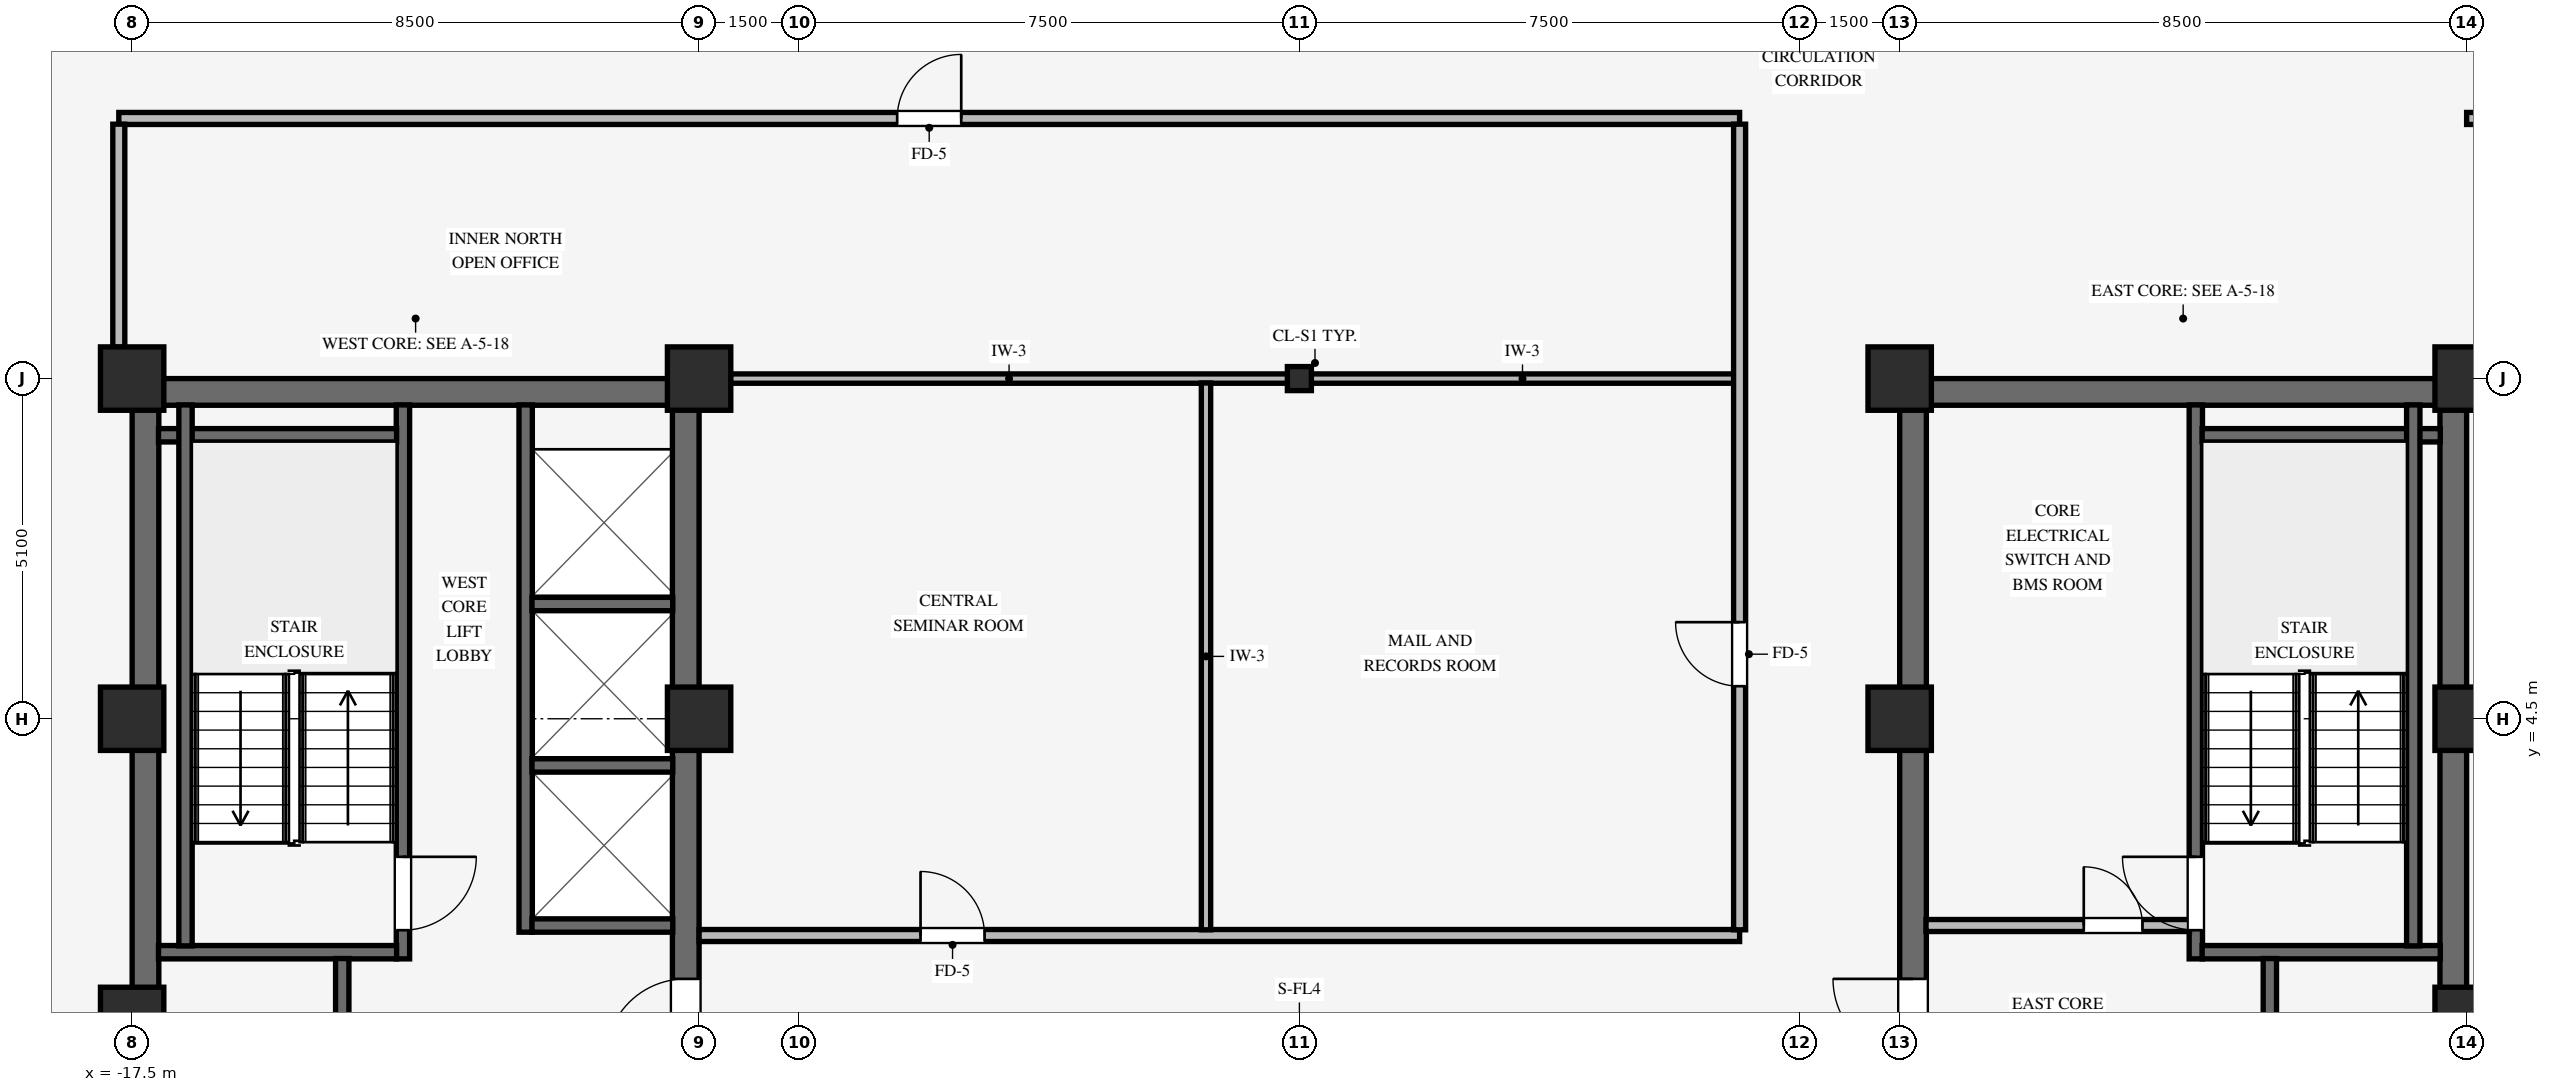
"""IFC4 building model, lengths in metres.
Left out: names, types, materials, properties, quantities, classifications, styles, units other than length and angle.
Written with IfcOpenShell. Run it as: python <this file> out.ifc"""

import sys

from ifc_helpers import new_model, si_unit, direction, frame, frame_2d, origin, origin_2d, place, context, subcontext, project, spatial, rectangle, i_section, extrude, source, transform, mapped, element, fill, save


model = new_model("IFC4")
c1 = context("Model", 3, precision=1e-05, world=origin(), true_north=direction((0.0, 1.0)))
c2 = subcontext(c1, "Body", "Model", "MODEL_VIEW")
j1 = project(units=[si_unit("LENGTHUNIT", "METRE"), si_unit("PLANEANGLEUNIT", "RADIAN")], contexts=[c1])
p1 = place(None, origin())
s1 = spatial("IfcSite", under=j1, at=p1, CompositionType="ELEMENT")
p2 = place(p1, origin())
s2 = spatial("IfcBuilding", under=s1, at=p2, CompositionType="ELEMENT")
p3 = place(p2, frame((0.0, 0.0, 127.5)))
s3 = spatial("IfcBuildingStorey", under=s2, at=p3, CompositionType="ELEMENT", Elevation=127.5)
p4 = place(p3, frame((-17.5, 9.4, 0.0), z_axis=(0.0, 0.0, 1.0), x_axis=(1.0, 0.0, 0.0)))
e1 = element("IfcWall", 1, at=p4, inside=s3, PredefinedType="SHEAR", context=c2, shape_type="SweptSolid", body=[
    extrude(rectangle(XDim=8.5, YDim=0.4, at=frame_2d((4.25, 0.0))), origin(), (0.0, 0.0, 1.0), 3.37),
])
p5 = place(p3, frame((-17.3, -9.205, 0.0), z_axis=(0.0, 0.0, 1.0), x_axis=(0.0, 1.0, 0.0)))
e2 = element("IfcWall", 2, at=p5, inside=s3, PredefinedType="SHEAR", context=c2, shape_type="SweptSolid", body=[
    extrude(rectangle(XDim=18.41, YDim=0.4, at=frame_2d((9.205, 0.0))), origin(), (0.0, 0.0, 1.0), 3.37),
])
p6 = place(p3, frame((-9.2, -9.205, 0.0), z_axis=(0.0, 0.0, 1.0), x_axis=(0.0, 1.0, 0.0)))
e3 = element("IfcWall", 3, at=p6, inside=s3, PredefinedType="SHEAR", context=c2, shape_type="SweptSolid", body=[
    extrude(rectangle(XDim=18.41, YDim=0.4, at=frame_2d((9.205, 0.0))), origin(), (0.0, 0.0, 1.0), 3.37),
])
p7 = place(p6, frame((8.605, 0.0, 0.0)))
e4 = element("IfcOpeningElement", 4, at=p7, cuts=e3, PredefinedType="OPENING", context=c2, shape_type="SweptSolid", body=[
    extrude(rectangle(XDim=1.2, YDim=2.15, at=frame_2d((0.6, 1.075))), frame((0.0, 0.21, 0.0), z_axis=(0.0, -1.0, 0.0), x_axis=(1.0, 0.0, 0.0)), (0.0, 0.0, 1.0), 0.42),
])
p8 = place(p3, frame((9.0, 9.4, 0.0), z_axis=(0.0, 0.0, 1.0), x_axis=(1.0, 0.0, 0.0)))
e5 = element("IfcWall", 5, at=p8, inside=s3, PredefinedType="SHEAR", context=c2, shape_type="SweptSolid", body=[
    extrude(rectangle(XDim=8.5, YDim=0.4, at=frame_2d((4.25, 0.0))), origin(), (0.0, 0.0, 1.0), 3.37),
])
p9 = place(p3, frame((9.2, -9.205, 0.0), z_axis=(0.0, 0.0, 1.0), x_axis=(0.0, 1.0, 0.0)))
e6 = element("IfcWall", 6, at=p9, inside=s3, PredefinedType="SHEAR", context=c2, shape_type="SweptSolid", body=[
    extrude(rectangle(XDim=18.41, YDim=0.4, at=frame_2d((9.205, 0.0))), origin(), (0.0, 0.0, 1.0), 3.37),
])
p10 = place(p9, frame((8.605, 0.0, 0.0)))
e7 = element("IfcOpeningElement", 7, at=p10, cuts=e6, PredefinedType="OPENING", context=c2, shape_type="SweptSolid", body=[
    extrude(rectangle(XDim=1.2, YDim=2.15, at=frame_2d((0.6, 1.075))), frame((0.0, 0.21, 0.0), z_axis=(0.0, -1.0, 0.0), x_axis=(1.0, 0.0, 0.0)), (0.0, 0.0, 1.0), 0.42),
])
p11 = place(p3, frame((17.3, -9.205, 0.0), z_axis=(0.0, 0.0, 1.0), x_axis=(0.0, 1.0, 0.0)))
e8 = element("IfcWall", 8, at=p11, inside=s3, PredefinedType="SHEAR", context=c2, shape_type="SweptSolid", body=[
    extrude(rectangle(XDim=18.41, YDim=0.4, at=frame_2d((9.205, 0.0))), origin(), (0.0, 0.0, 1.0), 3.37),
])
for number, where, z_axis, x_axis in (
    (9, (-17.5, 4.5, 0.0), (0.0, 0.0, 1.0), (1.0, 0.0, 0.0)),
    (10, (-17.5, 9.6, 0.0), (0.0, 0.0, 1.0), (1.0, 0.0, 0.0)),
    (11, (-9.0, 4.5, 0.0), (0.0, 0.0, 1.0), (1.0, 0.0, 0.0)),
    (12, (-9.0, 9.6, 0.0), (0.0, 0.0, 1.0), (1.0, 0.0, 0.0)),
    (13, (9.0, 4.5, 0.0), (0.0, 0.0, 1.0), (1.0, 0.0, 0.0)),
    (14, (9.0, 9.6, 0.0), (0.0, 0.0, 1.0), (1.0, 0.0, 0.0)),
    (15, (17.5, 4.5, 0.0), (0.0, 0.0, 1.0), (1.0, 0.0, 0.0)),
    (16, (17.5, 9.6, 0.0), (0.0, 0.0, 1.0), (1.0, 0.0, 0.0)),
    (17, (-17.5, 0.0, 0.0), (0.0, 0.0, 1.0), (1.0, 0.0, 0.0)),
    (18, (17.5, 0.0, 0.0), (0.0, 0.0, 1.0), (1.0, 0.0, 0.0)),
):
    element("IfcColumn", number, at=place(p3, frame(where, z_axis=z_axis, x_axis=x_axis)), inside=s3, PredefinedType="COLUMN", context=c2, shape_type="SweptSolid", body=[
        extrude(rectangle(XDim=0.95, YDim=0.95, at=origin_2d()), origin(), (0.0, 0.0, 1.0), 3.37),
    ])
p12 = place(p3, frame((0.0, 9.6, 0.0), z_axis=(0.0, 0.0, 1.0), x_axis=(1.0, 0.0, 0.0)))
e19 = element("IfcColumn", 19, at=p12, inside=s3, PredefinedType="COLUMN", context=c2, shape_type="SweptSolid", body=[
    extrude(i_section(OverallWidth=0.36, OverallDepth=0.36, WebThickness=0.021, FlangeThickness=0.021, FilletRadius=0.018, at=origin_2d()), origin(), (0.0, 0.0, 1.0), 3.37),
])
p13 = place(p3, frame((-13.44, 0.9, 0.0), z_axis=(0.0, 0.0, 1.0), x_axis=(0.0, 1.0, 0.0)))
e20 = element("IfcWall", 20, at=p13, inside=s3, PredefinedType="SHEAR", context=c2, shape_type="SweptSolid", body=[
    extrude(rectangle(XDim=8.305, YDim=0.2, at=frame_2d((4.153, 0.0))), origin(), (0.0, 0.0, 1.0), 3.37),
])
p14 = place(p13, frame((1.53, 0.0, 0.0), z_axis=(0.0, 0.0, 1.0), x_axis=(-1.0, 0.0, 0.0)))
e21 = element("IfcOpeningElement", 21, at=p14, cuts=e20, PredefinedType="OPENING", context=c2, shape_type="SweptSolid", body=[
    extrude(rectangle(XDim=1.1, YDim=2.15, at=frame_2d((0.55, 1.075))), frame((0.0, 0.11, 0.0), z_axis=(0.0, -1.0, 0.0), x_axis=(1.0, 0.0, 0.0)), (0.0, 0.0, 1.0), 0.22),
])
for number, where, z_axis, x_axis in (
    (22, (-17.105, 1.0, 0.0), (0.0, 0.0, 1.0), (1.0, 0.0, 0.0)),
    (23, (-17.105, 8.75, 0.0), (0.0, 0.0, 1.0), (1.0, 0.0, 0.0)),
):
    element("IfcWall", number, at=place(p3, frame(where, z_axis=z_axis, x_axis=x_axis)), inside=s3, PredefinedType="SHEAR", context=c2, shape_type="SweptSolid", body=[
        extrude(rectangle(XDim=3.57, YDim=0.2, at=frame_2d((1.785, 0.0))), origin(), (0.0, 0.0, 1.0), 3.37),
    ])
p15 = place(p3, frame((-16.7, 1.095, 0.0), z_axis=(0.0, 0.0, 1.0), x_axis=(0.0, 1.0, 0.0)))
e24 = element("IfcWall", 24, at=p15, inside=s3, PredefinedType="SHEAR", context=c2, shape_type="SweptSolid", body=[
    extrude(rectangle(XDim=8.11, YDim=0.2, at=frame_2d((4.055, 0.0))), origin(), (0.0, 0.0, 1.0), 3.37),
])
p16 = place(p3, frame((-14.35, -6.2, 0.0), z_axis=(0.0, 0.0, 1.0), x_axis=(0.0, 1.0, 0.0)))
e25 = element("IfcWall", 25, at=p16, inside=s3, PredefinedType="SHEAR", context=c2, shape_type="SweptSolid", body=[
    extrude(rectangle(XDim=7.105, YDim=0.2, at=frame_2d((3.552, 0.0))), origin(), (0.0, 0.0, 1.0), 3.37),
])
p17 = place(p16, frame((5.69, 0.0, 0.0), z_axis=(0.0, 0.0, 1.0), x_axis=(-1.0, 0.0, 0.0)))
e26 = element("IfcOpeningElement", 26, at=p17, cuts=e25, PredefinedType="OPENING", context=c2, shape_type="SweptSolid", body=[
    extrude(rectangle(XDim=0.88, YDim=2.1, at=frame_2d((0.44, 1.05))), frame((0.0, 0.11, 0.0), z_axis=(0.0, -1.0, 0.0), x_axis=(1.0, 0.0, 0.0)), (0.0, 0.0, 1.0), 0.22),
])
p18 = place(p16, frame((1.15, 0.0, 0.0)))
e27 = element("IfcOpeningElement", 27, at=p18, cuts=e25, PredefinedType="OPENING", context=c2, shape_type="SweptSolid", body=[
    extrude(rectangle(XDim=1.3, YDim=2.2, at=frame_2d((0.65, 1.1))), frame((0.0, 0.11, 0.0), z_axis=(0.0, -1.0, 0.0), x_axis=(1.0, 0.0, 0.0)), (0.0, 0.0, 1.0), 0.22),
])
p19 = place(p3, frame((-11.6, 1.3, 0.0), z_axis=(0.0, 0.0, 1.0), x_axis=(0.0, 1.0, 0.0)))
e28 = element("IfcWall", 28, at=p19, inside=s3, PredefinedType="SHEAR", context=c2, shape_type="SweptSolid", body=[
    extrude(rectangle(XDim=7.905, YDim=0.2, at=frame_2d((3.953, 0.0))), origin(), (0.0, 0.0, 1.0), 3.37),
])
for number, where, z_axis, x_axis in (
    (29, (-11.505, 1.4, 0.0), (0.0, 0.0, 1.0), (1.0, 0.0, 0.0)),
    (30, (-11.505, 3.8, 0.0), (0.0, 0.0, 1.0), (1.0, 0.0, 0.0)),
    (31, (-11.505, 6.22, 0.0), (0.0, 0.0, 1.0), (1.0, 0.0, 0.0)),
):
    element("IfcWall", number, at=place(p3, frame(where, z_axis=z_axis, x_axis=x_axis)), inside=s3, PredefinedType="SHEAR", context=c2, shape_type="SweptSolid", body=[
        extrude(rectangle(XDim=2.11, YDim=0.2, at=frame_2d((1.055, 0.0))), origin(), (0.0, 0.0, 1.0), 3.37),
    ])
p20 = place(p3, frame((13.44, 0.9, 0.0), z_axis=(0.0, 0.0, 1.0), x_axis=(0.0, 1.0, 0.0)))
e32 = element("IfcWall", 32, at=p20, inside=s3, PredefinedType="SHEAR", context=c2, shape_type="SweptSolid", body=[
    extrude(rectangle(XDim=8.305, YDim=0.2, at=frame_2d((4.153, 0.0))), origin(), (0.0, 0.0, 1.0), 3.37),
])
p21 = place(p20, frame((0.43, 0.0, 0.0)))
e33 = element("IfcOpeningElement", 33, at=p21, cuts=e32, PredefinedType="OPENING", context=c2, shape_type="SweptSolid", body=[
    extrude(rectangle(XDim=1.1, YDim=2.15, at=frame_2d((0.55, 1.075))), frame((0.0, 0.11, 0.0), z_axis=(0.0, -1.0, 0.0), x_axis=(1.0, 0.0, 0.0)), (0.0, 0.0, 1.0), 0.22),
])
for number, where, z_axis, x_axis in (
    (34, (13.535, 1.0, 0.0), (0.0, 0.0, 1.0), (1.0, 0.0, 0.0)),
    (35, (13.535, 8.75, 0.0), (0.0, 0.0, 1.0), (1.0, 0.0, 0.0)),
):
    element("IfcWall", number, at=place(p3, frame(where, z_axis=z_axis, x_axis=x_axis)), inside=s3, PredefinedType="SHEAR", context=c2, shape_type="SweptSolid", body=[
        extrude(rectangle(XDim=3.57, YDim=0.2, at=frame_2d((1.785, 0.0))), origin(), (0.0, 0.0, 1.0), 3.37),
    ])
p22 = place(p3, frame((16.7, 1.095, 0.0), z_axis=(0.0, 0.0, 1.0), x_axis=(0.0, 1.0, 0.0)))
e36 = element("IfcWall", 36, at=p22, inside=s3, PredefinedType="SHEAR", context=c2, shape_type="SweptSolid", body=[
    extrude(rectangle(XDim=8.11, YDim=0.2, at=frame_2d((4.055, 0.0))), origin(), (0.0, 0.0, 1.0), 3.37),
])
p23 = place(p3, frame((14.55, -9.205, 0.0), z_axis=(0.0, 0.0, 1.0), x_axis=(0.0, 1.0, 0.0)))
e37 = element("IfcWall", 37, at=p23, inside=s3, PredefinedType="SHEAR", context=c2, shape_type="SweptSolid", body=[
    extrude(rectangle(XDim=10.11, YDim=0.2, at=frame_2d((5.055, 0.0))), origin(), (0.0, 0.0, 1.0), 3.37),
])
p24 = place(p23, frame((6.565, 0.0, 0.0)))
e38 = element("IfcOpeningElement", 38, at=p24, cuts=e37, PredefinedType="OPENING", context=c2, shape_type="SweptSolid", body=[
    extrude(rectangle(XDim=0.88, YDim=2.1, at=frame_2d((0.44, 1.05))), frame((0.0, 0.11, 0.0), z_axis=(0.0, -1.0, 0.0), x_axis=(1.0, 0.0, 0.0)), (0.0, 0.0, 1.0), 0.22),
])
p25 = place(p23, frame((0.93, 0.0, 0.0)))
e39 = element("IfcOpeningElement", 39, at=p25, cuts=e37, PredefinedType="OPENING", context=c2, shape_type="SweptSolid", body=[
    extrude(rectangle(XDim=1.15, YDim=2.15, at=frame_2d((0.575, 1.075))), frame((0.0, 0.11, 0.0), z_axis=(0.0, -1.0, 0.0), x_axis=(1.0, 0.0, 0.0)), (0.0, 0.0, 1.0), 0.22),
])
p26 = place(p3, frame((9.395, 1.4, 0.0), z_axis=(0.0, 0.0, 1.0), x_axis=(1.0, 0.0, 0.0)))
e40 = element("IfcWall", 40, at=p26, inside=s3, PredefinedType="PARTITIONING", context=c2, shape_type="SweptSolid", body=[
    extrude(rectangle(XDim=3.95, YDim=0.18, at=frame_2d((1.975, 0.0))), origin(), (0.0, 0.0, 1.0), 3.36),
])
p27 = place(p26, frame((2.365, 0.0, 0.0)))
e41 = element("IfcOpeningElement", 41, at=p27, cuts=e40, PredefinedType="OPENING", context=c2, shape_type="SweptSolid", body=[
    extrude(rectangle(XDim=0.88, YDim=2.1, at=frame_2d((0.44, 1.05))), frame((0.0, 0.1, 0.0), z_axis=(0.0, -1.0, 0.0), x_axis=(1.0, 0.0, 0.0)), (0.0, 0.0, 1.0), 0.2),
])
p28 = place(p3, frame((-9.0, 1.25, 0.0), z_axis=(0.0, 0.0, 1.0), x_axis=(1.0, 0.0, 0.0)))
e42 = element("IfcWall", 42, at=p28, inside=s3, PredefinedType="PARTITIONING", context=c2, shape_type="SweptSolid", body=[
    extrude(rectangle(XDim=15.6, YDim=0.18, at=frame_2d((7.8, 0.0))), origin(), (0.0, 0.0, 1.0), 3.36),
])
p29 = place(p28, frame((3.32, 0.0, 0.0)))
e43 = element("IfcOpeningElement", 43, at=p29, cuts=e42, PredefinedType="OPENING", context=c2, shape_type="SweptSolid", body=[
    extrude(rectangle(XDim=0.96, YDim=2.1, at=frame_2d((0.48, 1.05))), frame((0.0, 0.1, 0.0), z_axis=(0.0, -1.0, 0.0), x_axis=(1.0, 0.0, 0.0)), (0.0, 0.0, 1.0), 0.2),
])
p30 = place(p3, frame((-8.529, 9.6, 0.0), z_axis=(0.0, 0.0, 1.0), x_axis=(1.0, 0.0, 0.0)))
e44 = element("IfcWall", 44, at=p30, inside=s3, PredefinedType="PARTITIONING", context=c2, shape_type="SweptSolid", body=[
    extrude(rectangle(XDim=8.353, YDim=0.14, at=frame_2d((4.177, 0.0))), origin(), (0.0, 0.0, 1.0), 2.405),
])
p31 = place(p3, frame((0.176, 9.6, 0.0), z_axis=(0.0, 0.0, 1.0), x_axis=(1.0, 0.0, 0.0)))
e45 = element("IfcWall", 45, at=p31, inside=s3, PredefinedType="PARTITIONING", context=c2, shape_type="SweptSolid", body=[
    extrude(rectangle(XDim=6.338, YDim=0.14, at=frame_2d((3.169, 0.0))), origin(), (0.0, 0.0, 1.0), 2.405),
])
p32 = place(p3, frame((-17.7, 13.5, 0.0), z_axis=(0.0, 0.0, 1.0), x_axis=(1.0, 0.0, 0.0)))
e46 = element("IfcWall", 46, at=p32, inside=s3, PredefinedType="PARTITIONING", context=c2, shape_type="SweptSolid", body=[
    extrude(rectangle(XDim=24.3, YDim=0.18, at=frame_2d((12.15, 0.0))), origin(), (0.0, 0.0, 1.0), 2.998),
])
p33 = place(p32, frame((11.67, 0.0, 0.0)))
e47 = element("IfcOpeningElement", 47, at=p33, cuts=e46, PredefinedType="OPENING", context=c2, shape_type="SweptSolid", body=[
    extrude(rectangle(XDim=0.96, YDim=2.1, at=frame_2d((0.48, 1.05))), frame((0.0, 0.1, 0.0), z_axis=(0.0, -1.0, 0.0), x_axis=(1.0, 0.0, 0.0)), (0.0, 0.0, 1.0), 0.2),
])
p34 = place(p3, frame((17.5, 13.5, 0.0), z_axis=(0.0, 0.0, 1.0), x_axis=(1.0, 0.0, 0.0)))
e48 = element("IfcWall", 48, at=p34, inside=s3, PredefinedType="PARTITIONING", context=c2, shape_type="SweptSolid", body=[
    extrude(rectangle(XDim=3.3, YDim=0.18, at=frame_2d((1.65, 0.0))), origin(), (0.0, 0.0, 1.0), 2.998),
])
p35 = place(p3, frame((-17.7, 10.071, 0.0), z_axis=(0.0, 0.0, 1.0), x_axis=(0.0, 1.0, 0.0)))
e49 = element("IfcWall", 49, at=p35, inside=s3, PredefinedType="PARTITIONING", context=c2, shape_type="SweptSolid", body=[
    extrude(rectangle(XDim=3.343, YDim=0.18, at=frame_2d((1.671, 0.0))), origin(), (0.0, 0.0, 1.0), 2.816),
])
p36 = place(p3, frame((-1.4, 1.336, 0.0), z_axis=(0.0, 0.0, 1.0), x_axis=(0.0, 1.0, 0.0)))
e50 = element("IfcWall", 50, at=p36, inside=s3, PredefinedType="PARTITIONING", context=c2, shape_type="SweptSolid", body=[
    extrude(rectangle(XDim=8.198, YDim=0.14, at=frame_2d((4.099, 0.0))), origin(), (0.0, 0.0, 1.0), 3.36),
])
p37 = place(p3, frame((6.6, 1.336, 0.0), z_axis=(0.0, 0.0, 1.0), x_axis=(0.0, 1.0, 0.0)))
e51 = element("IfcWall", 51, at=p37, inside=s3, PredefinedType="PARTITIONING", context=c2, shape_type="SweptSolid", body=[
    extrude(rectangle(XDim=12.078, YDim=0.18, at=frame_2d((6.039, 0.0))), origin(), (0.0, 0.0, 1.0), 3.36),
])
p38 = place(p37, frame((3.652, 0.0, 0.0)))
e52 = element("IfcOpeningElement", 52, at=p38, cuts=e51, PredefinedType="OPENING", context=c2, shape_type="SweptSolid", body=[
    extrude(rectangle(XDim=0.96, YDim=2.1, at=frame_2d((0.48, 1.05))), frame((0.0, 0.1, 0.0), z_axis=(0.0, -1.0, 0.0), x_axis=(1.0, 0.0, 0.0)), (0.0, 0.0, 1.0), 0.2),
])
m1 = source(origin(), c2, "Body", "SweptSolid", [
    extrude(rectangle(XDim=1.1, YDim=2.15, at=frame_2d((0.55, 1.075))), frame((0.0, 0.025, 0.0), z_axis=(0.0, -1.0, 0.0), x_axis=(1.0, 0.0, 0.0)), (0.0, 0.0, 1.0), 0.05),
])
p39 = place(p14, origin())
e53 = element("IfcDoor", 53, at=p39, inside=s3, OperationType="SINGLE_SWING_LEFT", PredefinedType="DOOR", context=c2, shape_type="MappedRepresentation", body=[
    mapped(m1, transform((0.0, 0.0, 0.0), scale=1.0)),
])
fill(e21, e53)
p40 = place(p21, origin())
e54 = element("IfcDoor", 54, at=p40, inside=s3, OperationType="SINGLE_SWING_RIGHT", PredefinedType="DOOR", context=c2, shape_type="MappedRepresentation", body=[
    mapped(m1, transform((0.0, 0.0, 0.0), scale=1.0)),
])
fill(e33, e54)
m2 = source(origin(), c2, "Body", "SweptSolid", [
    extrude(rectangle(XDim=1.2, YDim=2.15, at=frame_2d((0.6, 1.075))), frame((0.0, 0.025, 0.0), z_axis=(0.0, -1.0, 0.0), x_axis=(1.0, 0.0, 0.0)), (0.0, 0.0, 1.0), 0.05),
])
p41 = place(p7, origin())
e55 = element("IfcDoor", 55, at=p41, inside=s3, OperationType="SINGLE_SWING_LEFT", PredefinedType="DOOR", context=c2, shape_type="MappedRepresentation", body=[
    mapped(m2, transform((0.0, 0.0, 0.0), scale=1.0)),
])
fill(e4, e55)
p42 = place(p10, origin())
e56 = element("IfcDoor", 56, at=p42, inside=s3, OperationType="SINGLE_SWING_RIGHT", PredefinedType="DOOR", context=c2, shape_type="MappedRepresentation", body=[
    mapped(m2, transform((0.0, 0.0, 0.0), scale=1.0)),
])
fill(e7, e56)
m3 = source(origin(), c2, "Body", "SweptSolid", [
    extrude(rectangle(XDim=0.88, YDim=2.1, at=frame_2d((0.44, 1.05))), frame((0.0, 0.025, 0.0), z_axis=(0.0, -1.0, 0.0), x_axis=(1.0, 0.0, 0.0)), (0.0, 0.0, 1.0), 0.05),
])
p43 = place(p27, origin())
e57 = element("IfcDoor", 57, at=p43, inside=s3, OperationType="SINGLE_SWING_LEFT", PredefinedType="DOOR", context=c2, shape_type="MappedRepresentation", body=[
    mapped(m3, transform((0.0, 0.0, 0.0), scale=1.0)),
])
fill(e41, e57)
m4 = source(origin(), c2, "Body", "SweptSolid", [
    extrude(rectangle(XDim=0.96, YDim=2.1, at=frame_2d((0.48, 1.05))), frame((0.0, 0.025, 0.0), z_axis=(0.0, -1.0, 0.0), x_axis=(1.0, 0.0, 0.0)), (0.0, 0.0, 1.0), 0.05),
])
p44 = place(p33, origin())
e58 = element("IfcDoor", 58, at=p44, inside=s3, OperationType="SINGLE_SWING_RIGHT", PredefinedType="DOOR", context=c2, shape_type="MappedRepresentation", body=[
    mapped(m4, transform((0.0, 0.0, 0.0), scale=1.0)),
])
fill(e47, e58)
p45 = place(p38, origin())
e59 = element("IfcDoor", 59, at=p45, inside=s3, OperationType="SINGLE_SWING_RIGHT", PredefinedType="DOOR", context=c2, shape_type="MappedRepresentation", body=[
    mapped(m4, transform((0.0, 0.0, 0.0), scale=1.0)),
])
fill(e52, e59)
p46 = place(p29, origin())
e60 = element("IfcDoor", 60, at=p46, inside=s3, OperationType="SINGLE_SWING_LEFT", PredefinedType="DOOR", context=c2, shape_type="MappedRepresentation", body=[
    mapped(m4, transform((0.0, 0.0, 0.0), scale=1.0)),
])
fill(e43, e60)
save(model, sys.argv[1])
